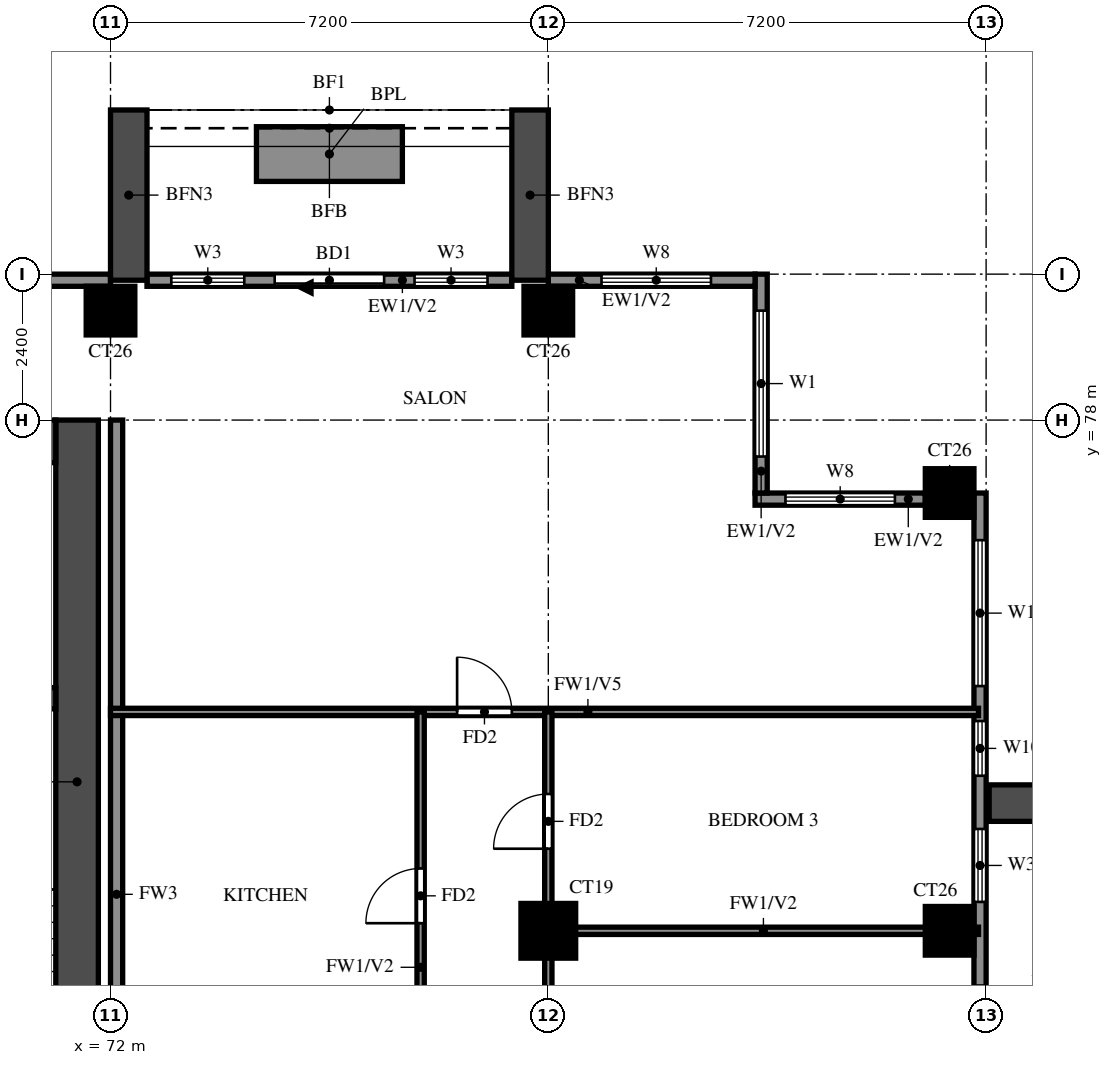
"""IFC4 building model, lengths in metres.
Left out: names, types, materials, properties, quantities, classifications, styles, units other than length and angle.
Written with IfcOpenShell. Run it as: python <this file> out.ifc"""

import sys

from ifc_helpers import new_model, si_unit, direction, frame, frame_2d, origin, origin_2d, place, context, subcontext, project, spatial, rectangle, extrude, source, transform, mapped, element, fill, save


model = new_model("IFC4")
c1 = context("Model", 3, precision=1e-05, world=origin(), true_north=direction((0.0, 1.0)))
c2 = subcontext(c1, "Body", "Model", "MODEL_VIEW")
j1 = project(units=[si_unit("LENGTHUNIT", "METRE"), si_unit("PLANEANGLEUNIT", "RADIAN")], contexts=[c1])
p1 = place(None, origin())
s1 = spatial("IfcSite", under=j1, at=p1, CompositionType="ELEMENT")
p2 = place(p1, origin())
s2 = spatial("IfcBuilding", under=s1, at=p2, CompositionType="ELEMENT")
p3 = place(p2, frame((0.0, 0.0, 188.5)))
s3 = spatial("IfcBuildingStorey", under=s2, at=p3, CompositionType="ELEMENT", Elevation=188.5)
m1 = source(origin(), c2, "Body", "SweptSolid", [
    extrude(rectangle(XDim=0.9, YDim=0.9, at=origin_2d()), origin(), (0.0, 0.0, 1.0), 3.2),
])
p4 = place(p3, frame((79.2, 69.6, 0.0), z_axis=(0.0, 0.0, 1.0), x_axis=(1.0, 0.0, 0.0)))
e1 = element("IfcColumn", 1, at=p4, inside=s3, PredefinedType="COLUMN", context=c2, shape_type="MappedRepresentation", body=[
    mapped(m1, transform((0.0, 0.0, 0.0))),
])
m2 = source(origin(), c2, "Body", "SweptSolid", [
    extrude(rectangle(XDim=0.8, YDim=0.8, at=origin_2d()), origin(), (0.0, 0.0, 1.0), 3.2),
])
for number, where, z_axis, x_axis in (
    (2, (85.8, 69.6, 0.0), (0.0, 0.0, 1.0), (1.0, 0.0, 0.0)),
    (3, (85.8, 76.8, 0.0), (0.0, 0.0, 1.0), (1.0, 0.0, 0.0)),
    (4, (72.0, 79.8, 0.0), (0.0, 0.0, 1.0), (1.0, 0.0, 0.0)),
    (5, (79.2, 79.8, 0.0), (0.0, 0.0, 1.0), (1.0, 0.0, 0.0)),
):
    element("IfcColumn", number, at=place(p3, frame(where, z_axis=z_axis, x_axis=x_axis)), inside=s3, PredefinedType="COLUMN", context=c2, shape_type="MappedRepresentation", body=[
        mapped(m2, transform((0.0, 0.0, 0.0))),
    ])
p5 = place(p3, frame((71.45, 66.1, 0.0), z_axis=(0.0, 0.0, 1.0), x_axis=(0.0, 1.0, 0.0)))
e6 = element("IfcWall", 6, at=p5, inside=s3, PredefinedType="SHEAR", context=c2, shape_type="SweptSolid", body=[
    extrude(rectangle(XDim=11.9, YDim=0.7, at=frame_2d((5.95, 0.0))), origin(), (0.0, 0.0, 1.0), 3.2),
])
p6 = place(p3, frame((29.7, 77.65, 0.0), z_axis=(0.0, 0.0, 1.0), x_axis=(1.0, 0.0, 0.0)))
e7 = element("IfcWall", 7, at=p6, inside=s3, PredefinedType="SHEAR", context=c2, shape_type="SweptSolid", body=[
    extrude(rectangle(XDim=41.4, YDim=0.7, at=frame_2d((20.7, 0.0))), origin(), (0.0, 0.0, 1.0), 3.2),
])
p7 = place(p3, frame((67.975, 73.425, 0.0), z_axis=(0.0, 0.0, 1.0), x_axis=(1.0, 0.0, 0.0)))
e8 = element("IfcWall", 8, at=p7, inside=s3, PredefinedType="SHEAR", context=c2, shape_type="SweptSolid", body=[
    extrude(rectangle(XDim=3.125, YDim=0.35, at=frame_2d((1.562, 0.0))), origin(), (0.0, 0.0, 1.0), 3.2),
])
p8 = place(p3, frame((86.3, 48.2, 0.0), z_axis=(0.0, 0.0, 1.0), x_axis=(0.0, 1.0, 0.0)))
e9 = element("IfcWall", 9, at=p8, inside=s3, PredefinedType="SOLIDWALL", context=c2, shape_type="SweptSolid", body=[
    extrude(rectangle(XDim=28.6, YDim=0.2, at=frame_2d((14.3, 0.0))), origin(), (0.0, 0.0, 1.0), 3.2),
])
p9 = place(p8, frame((4.3, 0.0, 0.0)))
e10 = element("IfcOpeningElement", 10, at=p9, cuts=e9, PredefinedType="OPENING", context=c2, shape_type="SweptSolid", body=[
    extrude(rectangle(XDim=1.8, YDim=2.4, at=frame_2d((0.9, 1.2))), frame((0.0, 0.11, 0.0), z_axis=(0.0, -1.0, 0.0), x_axis=(1.0, 0.0, 0.0)), (0.0, 0.0, 1.0), 0.22),
])
p10 = place(p8, frame((18.7, 0.0, 0.0)))
e11 = element("IfcOpeningElement", 11, at=p10, cuts=e9, PredefinedType="OPENING", context=c2, shape_type="SweptSolid", body=[
    extrude(rectangle(XDim=1.8, YDim=2.4, at=frame_2d((0.9, 1.2))), frame((0.0, 0.11, 0.0), z_axis=(0.0, -1.0, 0.0), x_axis=(1.0, 0.0, 0.0)), (0.0, 0.0, 1.0), 0.22),
])
p11 = place(p8, frame((0.6, 0.0, 0.6)))
e12 = element("IfcOpeningElement", 12, at=p11, cuts=e9, PredefinedType="OPENING", context=c2, shape_type="SweptSolid", body=[
    extrude(rectangle(XDim=1.2, YDim=2.4, at=frame_2d((0.6, 1.2))), frame((0.0, 0.11, 0.0), z_axis=(0.0, -1.0, 0.0), x_axis=(1.0, 0.0, 0.0)), (0.0, 0.0, 1.0), 0.22),
])
p12 = place(p8, frame((7.475, 0.0, 0.6)))
e13 = element("IfcOpeningElement", 13, at=p12, cuts=e9, PredefinedType="OPENING", context=c2, shape_type="SweptSolid", body=[
    extrude(rectangle(XDim=1.2, YDim=2.4, at=frame_2d((0.6, 1.2))), frame((0.0, 0.11, 0.0), z_axis=(0.0, -1.0, 0.0), x_axis=(1.0, 0.0, 0.0)), (0.0, 0.0, 1.0), 0.22),
])
p13 = place(p8, frame((9.55, 0.0, 0.6)))
e14 = element("IfcOpeningElement", 14, at=p13, cuts=e9, PredefinedType="OPENING", context=c2, shape_type="SweptSolid", body=[
    extrude(rectangle(XDim=0.9, YDim=2.4, at=frame_2d((0.45, 1.2))), frame((0.0, 0.11, 0.0), z_axis=(0.0, -1.0, 0.0), x_axis=(1.0, 0.0, 0.0)), (0.0, 0.0, 1.0), 0.22),
])
p14 = place(p8, frame((11.025, 0.0, 0.6)))
e15 = element("IfcOpeningElement", 15, at=p14, cuts=e9, PredefinedType="OPENING", context=c2, shape_type="SweptSolid", body=[
    extrude(rectangle(XDim=2.4, YDim=2.4, at=frame_2d((1.2, 1.2))), frame((0.0, 0.11, 0.0), z_axis=(0.0, -1.0, 0.0), x_axis=(1.0, 0.0, 0.0)), (0.0, 0.0, 1.0), 0.22),
])
p15 = place(p8, frame((14.675, 0.0, 0.6)))
e16 = element("IfcOpeningElement", 16, at=p15, cuts=e9, PredefinedType="OPENING", context=c2, shape_type="SweptSolid", body=[
    extrude(rectangle(XDim=1.8, YDim=2.4, at=frame_2d((0.9, 1.2))), frame((0.0, 0.11, 0.0), z_axis=(0.0, -1.0, 0.0), x_axis=(1.0, 0.0, 0.0)), (0.0, 0.0, 1.0), 0.22),
])
p16 = place(p8, frame((21.875, 0.0, 0.6)))
e17 = element("IfcOpeningElement", 17, at=p16, cuts=e9, PredefinedType="OPENING", context=c2, shape_type="SweptSolid", body=[
    extrude(rectangle(XDim=1.2, YDim=2.4, at=frame_2d((0.6, 1.2))), frame((0.0, 0.11, 0.0), z_axis=(0.0, -1.0, 0.0), x_axis=(1.0, 0.0, 0.0)), (0.0, 0.0, 1.0), 0.22),
])
p17 = place(p8, frame((23.95, 0.0, 0.6)))
e18 = element("IfcOpeningElement", 18, at=p17, cuts=e9, PredefinedType="OPENING", context=c2, shape_type="SweptSolid", body=[
    extrude(rectangle(XDim=0.9, YDim=2.4, at=frame_2d((0.45, 1.2))), frame((0.0, 0.11, 0.0), z_axis=(0.0, -1.0, 0.0), x_axis=(1.0, 0.0, 0.0)), (0.0, 0.0, 1.0), 0.22),
])
p18 = place(p8, frame((25.425, 0.0, 0.6)))
e19 = element("IfcOpeningElement", 19, at=p18, cuts=e9, PredefinedType="OPENING", context=c2, shape_type="SweptSolid", body=[
    extrude(rectangle(XDim=2.4, YDim=2.4, at=frame_2d((1.2, 1.2))), frame((0.0, 0.11, 0.0), z_axis=(0.0, -1.0, 0.0), x_axis=(1.0, 0.0, 0.0)), (0.0, 0.0, 1.0), 0.22),
])
p19 = place(p3, frame((85.4, 76.7, 0.0), z_axis=(0.0, 0.0, 1.0), x_axis=(-1.0, 0.0, 0.0)))
e20 = element("IfcWall", 20, at=p19, inside=s3, PredefinedType="SOLIDWALL", context=c2, shape_type="SweptSolid", body=[
    extrude(rectangle(XDim=2.8, YDim=0.2, at=frame_2d((1.4, 0.0))), origin(), (0.0, 0.0, 1.0), 3.2),
])
p20 = place(p19, frame((0.5, 0.0, 0.6)))
e21 = element("IfcOpeningElement", 21, at=p20, cuts=e20, PredefinedType="OPENING", context=c2, shape_type="SweptSolid", body=[
    extrude(rectangle(XDim=1.8, YDim=2.4, at=frame_2d((0.9, 1.2))), frame((0.0, 0.11, 0.0), z_axis=(0.0, -1.0, 0.0), x_axis=(1.0, 0.0, 0.0)), (0.0, 0.0, 1.0), 0.22),
])
p21 = place(p3, frame((82.7, 76.8, 0.0), z_axis=(0.0, 0.0, 1.0), x_axis=(0.0, 1.0, 0.0)))
e22 = element("IfcWall", 22, at=p21, inside=s3, PredefinedType="SOLIDWALL", context=c2, shape_type="SweptSolid", body=[
    extrude(rectangle(XDim=3.6, YDim=0.2, at=frame_2d((1.8, 0.0))), origin(), (0.0, 0.0, 1.0), 3.2),
])
p22 = place(p21, frame((0.6, 0.0, 0.6)))
e23 = element("IfcOpeningElement", 23, at=p22, cuts=e22, PredefinedType="OPENING", context=c2, shape_type="SweptSolid", body=[
    extrude(rectangle(XDim=2.4, YDim=2.4, at=frame_2d((1.2, 1.2))), frame((0.0, 0.11, 0.0), z_axis=(0.0, -1.0, 0.0), x_axis=(1.0, 0.0, 0.0)), (0.0, 0.0, 1.0), 0.22),
])
p23 = place(p3, frame((82.6, 80.3, 0.0), z_axis=(0.0, 0.0, 1.0), x_axis=(-1.0, 0.0, 0.0)))
e24 = element("IfcWall", 24, at=p23, inside=s3, PredefinedType="SOLIDWALL", context=c2, shape_type="SweptSolid", body=[
    extrude(rectangle(XDim=3.4, YDim=0.2, at=frame_2d((1.7, 0.0))), origin(), (0.0, 0.0, 1.0), 3.2),
])
p24 = place(p23, frame((0.725, 0.0, 0.6)))
e25 = element("IfcOpeningElement", 25, at=p24, cuts=e24, PredefinedType="OPENING", context=c2, shape_type="SweptSolid", body=[
    extrude(rectangle(XDim=1.8, YDim=2.4, at=frame_2d((0.9, 1.2))), frame((0.0, 0.11, 0.0), z_axis=(0.0, -1.0, 0.0), x_axis=(1.0, 0.0, 0.0)), (0.0, 0.0, 1.0), 0.22),
])
p25 = place(p3, frame((78.6, 80.3, 0.0), z_axis=(0.0, 0.0, 1.0), x_axis=(-1.0, 0.0, 0.0)))
e26 = element("IfcWall", 26, at=p25, inside=s3, PredefinedType="SOLIDWALL", context=c2, shape_type="SweptSolid", body=[
    extrude(rectangle(XDim=6.0, YDim=0.2, at=frame_2d((3.0, 0.0))), origin(), (0.0, 0.0, 1.0), 3.2),
])
p26 = place(p25, frame((2.1, 0.0, 0.0)))
e27 = element("IfcOpeningElement", 27, at=p26, cuts=e26, PredefinedType="OPENING", context=c2, shape_type="SweptSolid", body=[
    extrude(rectangle(XDim=1.8, YDim=2.4, at=frame_2d((0.9, 1.2))), frame((0.0, 0.11, 0.0), z_axis=(0.0, -1.0, 0.0), x_axis=(1.0, 0.0, 0.0)), (0.0, 0.0, 1.0), 0.22),
])
p27 = place(p25, frame((0.4, 0.0, 0.6)))
e28 = element("IfcOpeningElement", 28, at=p27, cuts=e26, PredefinedType="OPENING", context=c2, shape_type="SweptSolid", body=[
    extrude(rectangle(XDim=1.2, YDim=2.4, at=frame_2d((0.6, 1.2))), frame((0.0, 0.11, 0.0), z_axis=(0.0, -1.0, 0.0), x_axis=(1.0, 0.0, 0.0)), (0.0, 0.0, 1.0), 0.22),
])
p28 = place(p25, frame((4.4, 0.0, 0.6)))
e29 = element("IfcOpeningElement", 29, at=p28, cuts=e26, PredefinedType="OPENING", context=c2, shape_type="SweptSolid", body=[
    extrude(rectangle(XDim=1.2, YDim=2.4, at=frame_2d((0.6, 1.2))), frame((0.0, 0.11, 0.0), z_axis=(0.0, -1.0, 0.0), x_axis=(1.0, 0.0, 0.0)), (0.0, 0.0, 1.0), 0.22),
])
p29 = place(p3, frame((72.0, 80.3, 0.0), z_axis=(0.0, 0.0, 1.0), x_axis=(-1.0, 0.0, 0.0)))
e30 = element("IfcWall", 30, at=p29, inside=s3, PredefinedType="SOLIDWALL", context=c2, shape_type="SweptSolid", body=[
    extrude(rectangle(XDim=54.0, YDim=0.2, at=frame_2d((27.0, 0.0))), origin(), (0.0, 0.0, 1.0), 3.2),
])
p30 = place(p29, frame((44.15, 0.0, 0.6)))
e31 = element("IfcOpeningElement", 31, at=p30, cuts=e30, PredefinedType="OPENING", context=c2, shape_type="SweptSolid", body=[
    extrude(rectangle(XDim=2.4, YDim=2.4, at=frame_2d((1.2, 1.2))), frame((0.0, 0.11, 0.0), z_axis=(0.0, -1.0, 0.0), x_axis=(1.0, 0.0, 0.0)), (0.0, 0.0, 1.0), 0.22),
])
p31 = place(p29, frame((47.05, 0.0, 0.6)))
e32 = element("IfcOpeningElement", 32, at=p31, cuts=e30, PredefinedType="OPENING", context=c2, shape_type="SweptSolid", body=[
    extrude(rectangle(XDim=2.4, YDim=2.4, at=frame_2d((1.2, 1.2))), frame((0.0, 0.11, 0.0), z_axis=(0.0, -1.0, 0.0), x_axis=(1.0, 0.0, 0.0)), (0.0, 0.0, 1.0), 0.22),
])
p32 = place(p29, frame((51.375, 0.0, 0.6)))
e33 = element("IfcOpeningElement", 33, at=p32, cuts=e30, PredefinedType="OPENING", context=c2, shape_type="SweptSolid", body=[
    extrude(rectangle(XDim=1.8, YDim=2.4, at=frame_2d((0.9, 1.2))), frame((0.0, 0.11, 0.0), z_axis=(0.0, -1.0, 0.0), x_axis=(1.0, 0.0, 0.0)), (0.0, 0.0, 1.0), 0.22),
])
p33 = place(p3, frame((86.45, 71.7, 0.0), z_axis=(0.0, 0.0, 1.0), x_axis=(1.0, 0.0, 0.0)))
e34 = element("IfcWall", 34, at=p33, inside=s3, PredefinedType="SOLIDWALL", context=c2, shape_type="SweptSolid", body=[
    extrude(rectangle(XDim=2.65, YDim=0.6, at=frame_2d((1.325, 0.0))), origin(), (0.0, 0.0, 1.0), 2.85),
])
for number, where, z_axis, x_axis in (
    (35, (78.9, 80.3, 0.0), (0.0, 0.0, 1.0), (0.0, 1.0, 0.0)),
    (36, (72.3, 80.3, 0.0), (0.0, 0.0, 1.0), (0.0, 1.0, 0.0)),
):
    element("IfcWall", number, at=place(p3, frame(where, z_axis=z_axis, x_axis=x_axis)), inside=s3, PredefinedType="SOLIDWALL", context=c2, shape_type="SweptSolid", body=[
        extrude(rectangle(XDim=2.8, YDim=0.6, at=frame_2d((1.4, 0.0))), origin(), (0.0, 0.0, 1.0), 2.85),
    ])
p34 = place(p3, frame((76.8, 82.375, 0.0), z_axis=(0.0, 0.0, 1.0), x_axis=(-1.0, 0.0, 0.0)))
e37 = element("IfcWall", 37, at=p34, inside=s3, PredefinedType="SOLIDWALL", context=c2, shape_type="SweptSolid", body=[
    extrude(rectangle(XDim=2.4, YDim=0.9, at=frame_2d((1.2, 0.0))), origin(), (0.0, 0.0, 1.0), 0.9),
])
p35 = place(p3, frame((72.1, 62.4, 0.0), z_axis=(0.0, 0.0, 1.0), x_axis=(0.0, 1.0, 0.0)))
e38 = element("IfcWall", 38, at=p35, inside=s3, PredefinedType="SOLIDWALL", context=c2, shape_type="SweptSolid", body=[
    extrude(rectangle(XDim=15.6, YDim=0.2, at=frame_2d((7.8, 0.0))), origin(), (0.0, 0.0, 1.0), 3.2),
])
p36 = place(p3, frame((79.2, 69.6, 0.0), z_axis=(0.0, 0.0, 1.0), x_axis=(1.0, 0.0, 0.0)))
e39 = element("IfcWall", 39, at=p36, inside=s3, PredefinedType="PARTITIONING", context=c2, shape_type="SweptSolid", body=[
    extrude(rectangle(XDim=7.075, YDim=0.12, at=frame_2d((3.538, 0.0))), origin(), (0.0, 0.0, 1.0), 3.2),
])
p37 = place(p3, frame((72.0, 73.2, 0.0), z_axis=(0.0, 0.0, 1.0), x_axis=(1.0, 0.0, 0.0)))
e40 = element("IfcWall", 40, at=p37, inside=s3, PredefinedType="PARTITIONING", context=c2, shape_type="SweptSolid", body=[
    extrude(rectangle(XDim=14.275, YDim=0.12, at=frame_2d((7.137, 0.0))), origin(), (0.0, 0.0, 1.0), 2.3),
])
p38 = place(p37, frame((5.7, 0.0, 0.0)))
e41 = element("IfcOpeningElement", 41, at=p38, cuts=e40, PredefinedType="OPENING", context=c2, shape_type="SweptSolid", body=[
    extrude(rectangle(XDim=0.9, YDim=2.1, at=frame_2d((0.45, 1.05))), frame((0.0, 0.07, 0.0), z_axis=(0.0, -1.0, 0.0), x_axis=(1.0, 0.0, 0.0)), (0.0, 0.0, 1.0), 0.14),
])
p39 = place(p3, frame((77.1, 64.8, 0.0), z_axis=(0.0, 0.0, 1.0), x_axis=(0.0, 1.0, 0.0)))
e42 = element("IfcWall", 42, at=p39, inside=s3, PredefinedType="PARTITIONING", context=c2, shape_type="SweptSolid", body=[
    extrude(rectangle(XDim=8.4, YDim=0.12, at=frame_2d((4.2, 0.0))), origin(), (0.0, 0.0, 1.0), 3.2),
])
p40 = place(p39, frame((4.925, 0.0, 0.0)))
e43 = element("IfcOpeningElement", 43, at=p40, cuts=e42, PredefinedType="OPENING", context=c2, shape_type="SweptSolid", body=[
    extrude(rectangle(XDim=0.9, YDim=2.1, at=frame_2d((0.45, 1.05))), frame((0.0, 0.07, 0.0), z_axis=(0.0, -1.0, 0.0), x_axis=(1.0, 0.0, 0.0)), (0.0, 0.0, 1.0), 0.14),
])
p41 = place(p3, frame((79.2, 48.125, 0.0), z_axis=(0.0, 0.0, 1.0), x_axis=(0.0, 1.0, 0.0)))
e44 = element("IfcWall", 44, at=p41, inside=s3, PredefinedType="PARTITIONING", context=c2, shape_type="SweptSolid", body=[
    extrude(rectangle(XDim=25.075, YDim=0.12, at=frame_2d((12.538, 0.0))), origin(), (0.0, 0.0, 1.0), 3.2),
])
p42 = place(p41, frame((1.288, 0.0, 0.0)))
e45 = element("IfcOpeningElement", 45, at=p42, cuts=e44, PredefinedType="OPENING", context=c2, shape_type="SweptSolid", body=[
    extrude(rectangle(XDim=0.9, YDim=2.1, at=frame_2d((0.45, 1.05))), frame((0.0, 0.07, 0.0), z_axis=(0.0, -1.0, 0.0), x_axis=(1.0, 0.0, 0.0)), (0.0, 0.0, 1.0), 0.14),
])
p43 = place(p41, frame((7.825, 0.0, 0.0)))
e46 = element("IfcOpeningElement", 46, at=p43, cuts=e44, PredefinedType="OPENING", context=c2, shape_type="SweptSolid", body=[
    extrude(rectangle(XDim=1.5, YDim=2.1, at=frame_2d((0.75, 1.05))), frame((0.0, 0.07, 0.0), z_axis=(0.0, -1.0, 0.0), x_axis=(1.0, 0.0, 0.0)), (0.0, 0.0, 1.0), 0.14),
])
p44 = place(p41, frame((12.025, 0.0, 0.0)))
e47 = element("IfcOpeningElement", 47, at=p44, cuts=e44, PredefinedType="OPENING", context=c2, shape_type="SweptSolid", body=[
    extrude(rectangle(XDim=0.9, YDim=2.1, at=frame_2d((0.45, 1.05))), frame((0.0, 0.07, 0.0), z_axis=(0.0, -1.0, 0.0), x_axis=(1.0, 0.0, 0.0)), (0.0, 0.0, 1.0), 0.14),
])
p45 = place(p41, frame((15.625, 0.0, 0.0)))
e48 = element("IfcOpeningElement", 48, at=p45, cuts=e44, PredefinedType="OPENING", context=c2, shape_type="SweptSolid", body=[
    extrude(rectangle(XDim=0.9, YDim=2.1, at=frame_2d((0.45, 1.05))), frame((0.0, 0.07, 0.0), z_axis=(0.0, -1.0, 0.0), x_axis=(1.0, 0.0, 0.0)), (0.0, 0.0, 1.0), 0.14),
])
p46 = place(p41, frame((19.225, 0.0, 0.0)))
e49 = element("IfcOpeningElement", 49, at=p46, cuts=e44, PredefinedType="OPENING", context=c2, shape_type="SweptSolid", body=[
    extrude(rectangle(XDim=0.9, YDim=2.1, at=frame_2d((0.45, 1.05))), frame((0.0, 0.07, 0.0), z_axis=(0.0, -1.0, 0.0), x_axis=(1.0, 0.0, 0.0)), (0.0, 0.0, 1.0), 0.14),
])
p47 = place(p41, frame((22.825, 0.0, 0.0)))
e50 = element("IfcOpeningElement", 50, at=p47, cuts=e44, PredefinedType="OPENING", context=c2, shape_type="SweptSolid", body=[
    extrude(rectangle(XDim=0.9, YDim=2.1, at=frame_2d((0.45, 1.05))), frame((0.0, 0.07, 0.0), z_axis=(0.0, -1.0, 0.0), x_axis=(1.0, 0.0, 0.0)), (0.0, 0.0, 1.0), 0.14),
])
p48 = place(p16, origin())
e51 = element("IfcWindow", 51, at=p48, inside=s3, PartitioningType="SINGLE_PANEL", PredefinedType="WINDOW", context=c2, shape_type="SweptSolid", body=[
    extrude(rectangle(XDim=1.2, YDim=2.4, at=frame_2d((0.6, 1.2))), frame((0.0, 0.03, 0.0), z_axis=(0.0, -1.0, 0.0), x_axis=(1.0, 0.0, 0.0)), (0.0, 0.0, 1.0), 0.06),
])
fill(e17, e51)
p49 = place(p17, origin())
e52 = element("IfcWindow", 52, at=p49, inside=s3, PartitioningType="SINGLE_PANEL", PredefinedType="WINDOW", context=c2, shape_type="SweptSolid", body=[
    extrude(rectangle(XDim=0.9, YDim=2.4, at=frame_2d((0.45, 1.2))), frame((0.0, 0.03, 0.0), z_axis=(0.0, -1.0, 0.0), x_axis=(1.0, 0.0, 0.0)), (0.0, 0.0, 1.0), 0.06),
])
fill(e18, e52)
p50 = place(p18, origin())
e53 = element("IfcWindow", 53, at=p50, inside=s3, PartitioningType="DOUBLE_PANEL_VERTICAL", PredefinedType="WINDOW", context=c2, shape_type="SweptSolid", body=[
    extrude(rectangle(XDim=2.4, YDim=2.4, at=frame_2d((1.2, 1.2))), frame((0.0, 0.03, 0.0), z_axis=(0.0, -1.0, 0.0), x_axis=(1.0, 0.0, 0.0)), (0.0, 0.0, 1.0), 0.06),
])
fill(e19, e53)
p51 = place(p20, origin())
e54 = element("IfcWindow", 54, at=p51, inside=s3, PartitioningType="DOUBLE_PANEL_VERTICAL", PredefinedType="WINDOW", context=c2, shape_type="SweptSolid", body=[
    extrude(rectangle(XDim=1.8, YDim=2.4, at=frame_2d((0.9, 1.2))), frame((0.0, 0.03, 0.0), z_axis=(0.0, -1.0, 0.0), x_axis=(1.0, 0.0, 0.0)), (0.0, 0.0, 1.0), 0.06),
])
fill(e21, e54)
p52 = place(p22, origin())
e55 = element("IfcWindow", 55, at=p52, inside=s3, PartitioningType="DOUBLE_PANEL_VERTICAL", PredefinedType="WINDOW", context=c2, shape_type="SweptSolid", body=[
    extrude(rectangle(XDim=2.4, YDim=2.4, at=frame_2d((1.2, 1.2))), frame((0.0, 0.03, 0.0), z_axis=(0.0, -1.0, 0.0), x_axis=(1.0, 0.0, 0.0)), (0.0, 0.0, 1.0), 0.06),
])
fill(e23, e55)
p53 = place(p24, origin())
e56 = element("IfcWindow", 56, at=p53, inside=s3, PartitioningType="DOUBLE_PANEL_VERTICAL", PredefinedType="WINDOW", context=c2, shape_type="SweptSolid", body=[
    extrude(rectangle(XDim=1.8, YDim=2.4, at=frame_2d((0.9, 1.2))), frame((0.0, 0.03, 0.0), z_axis=(0.0, -1.0, 0.0), x_axis=(1.0, 0.0, 0.0)), (0.0, 0.0, 1.0), 0.06),
])
fill(e25, e56)
p54 = place(p26, origin())
e57 = element("IfcDoor", 57, at=p54, inside=s3, OperationType="DOUBLE_DOOR_SLIDING", PredefinedType="DOOR", context=c2, shape_type="SweptSolid", body=[
    extrude(rectangle(XDim=1.8, YDim=2.4, at=frame_2d((0.9, 1.2))), frame((0.0, 0.025, 0.0), z_axis=(0.0, -1.0, 0.0), x_axis=(1.0, 0.0, 0.0)), (0.0, 0.0, 1.0), 0.05),
])
fill(e27, e57)
p55 = place(p27, origin())
e58 = element("IfcWindow", 58, at=p55, inside=s3, PartitioningType="SINGLE_PANEL", PredefinedType="WINDOW", context=c2, shape_type="SweptSolid", body=[
    extrude(rectangle(XDim=1.2, YDim=2.4, at=frame_2d((0.6, 1.2))), frame((0.0, 0.03, 0.0), z_axis=(0.0, -1.0, 0.0), x_axis=(1.0, 0.0, 0.0)), (0.0, 0.0, 1.0), 0.06),
])
fill(e28, e58)
p56 = place(p28, origin())
e59 = element("IfcWindow", 59, at=p56, inside=s3, PartitioningType="SINGLE_PANEL", PredefinedType="WINDOW", context=c2, shape_type="SweptSolid", body=[
    extrude(rectangle(XDim=1.2, YDim=2.4, at=frame_2d((0.6, 1.2))), frame((0.0, 0.03, 0.0), z_axis=(0.0, -1.0, 0.0), x_axis=(1.0, 0.0, 0.0)), (0.0, 0.0, 1.0), 0.06),
])
fill(e29, e59)
p57 = place(p47, origin())
e60 = element("IfcDoor", 60, at=p57, inside=s3, OperationType="SINGLE_SWING_RIGHT", PredefinedType="DOOR", context=c2, shape_type="SweptSolid", body=[
    extrude(rectangle(XDim=0.9, YDim=2.1, at=frame_2d((0.45, 1.05))), frame((0.0, 0.025, 0.0), z_axis=(0.0, -1.0, 0.0), x_axis=(1.0, 0.0, 0.0)), (0.0, 0.0, 1.0), 0.05),
])
fill(e50, e60)
p58 = place(p38, origin())
e61 = element("IfcDoor", 61, at=p58, inside=s3, OperationType="SINGLE_SWING_LEFT", PredefinedType="DOOR", context=c2, shape_type="SweptSolid", body=[
    extrude(rectangle(XDim=0.9, YDim=2.1, at=frame_2d((0.45, 1.05))), frame((0.0, 0.025, 0.0), z_axis=(0.0, -1.0, 0.0), x_axis=(1.0, 0.0, 0.0)), (0.0, 0.0, 1.0), 0.05),
])
fill(e41, e61)
p59 = place(p40, origin())
e62 = element("IfcDoor", 62, at=p59, inside=s3, OperationType="SINGLE_SWING_RIGHT", PredefinedType="DOOR", context=c2, shape_type="SweptSolid", body=[
    extrude(rectangle(XDim=0.9, YDim=2.1, at=frame_2d((0.45, 1.05))), frame((0.0, 0.025, 0.0), z_axis=(0.0, -1.0, 0.0), x_axis=(1.0, 0.0, 0.0)), (0.0, 0.0, 1.0), 0.05),
])
fill(e43, e62)
save(model, sys.argv[1])
